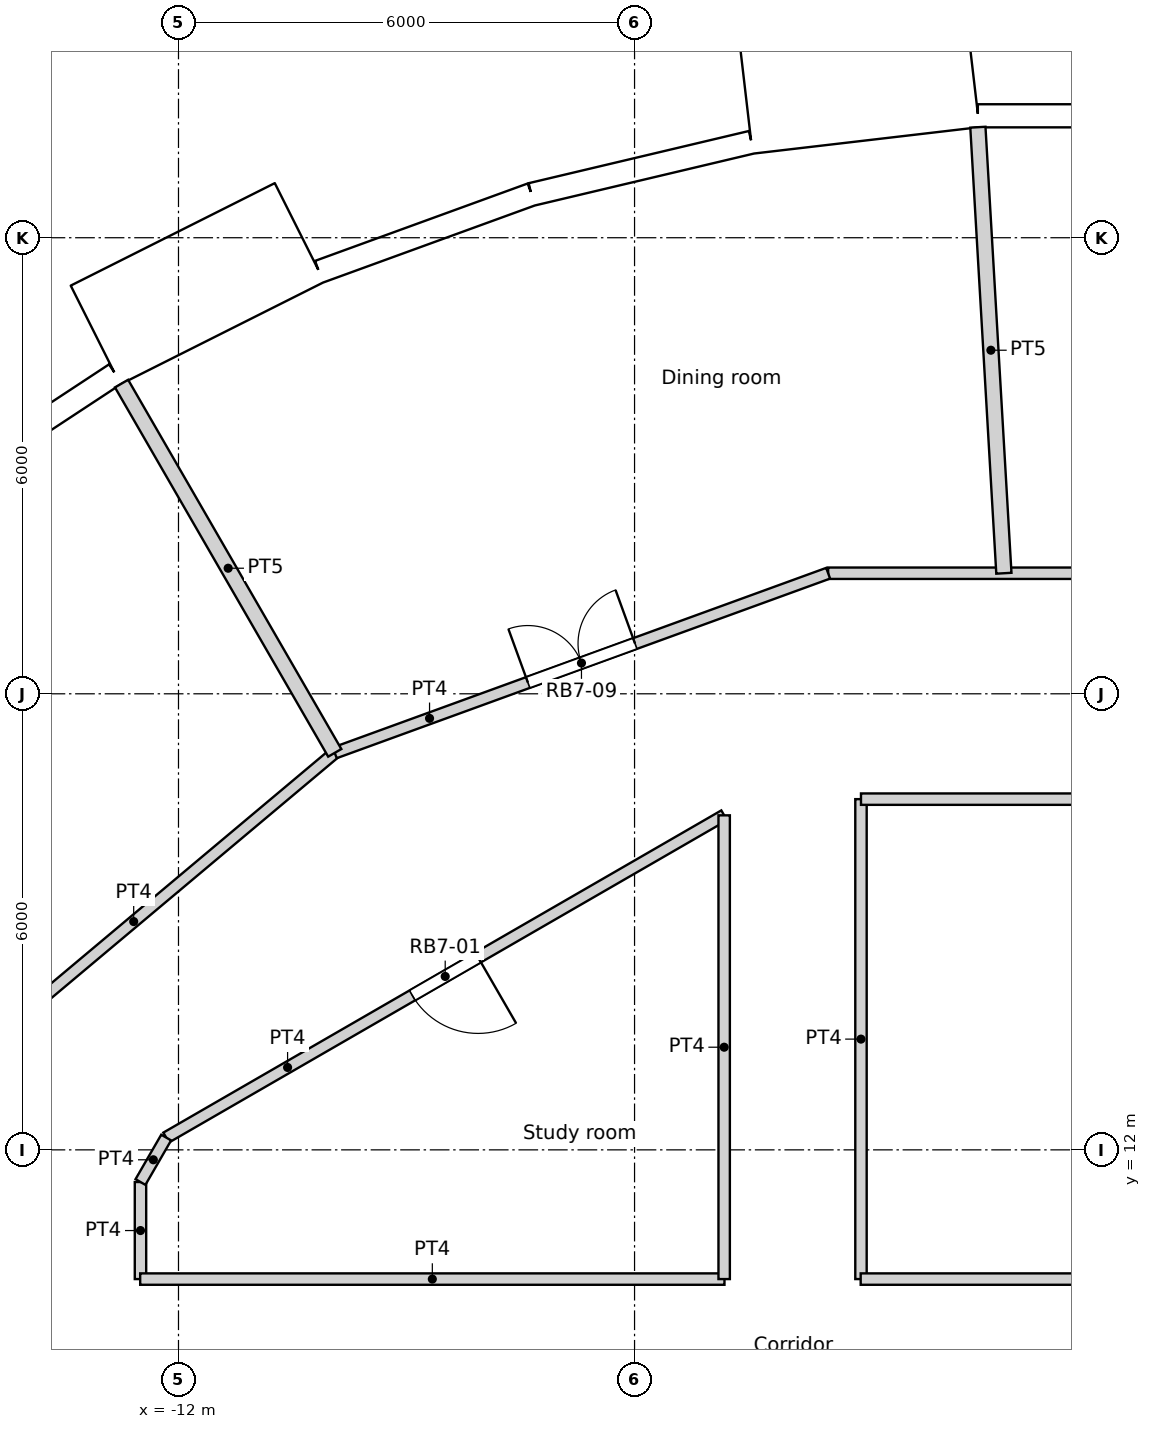
"""IFC4 building model, lengths in metres.
Left out: names, types, materials, properties, quantities, classifications, styles, units other than length and angle.
Written with IfcOpenShell. Run it as: python <this file> out.ifc"""

import sys

from ifc_helpers import new_model, si_unit, direction, frame, frame_2d, origin, origin_2d, place, context, subcontext, project, spatial, rectangle, circle, extrude, element, fill, save


model = new_model("IFC4")
c1 = context("Model", 3, precision=1e-05, world=origin(), true_north=direction((0.0, 1.0)))
c2 = subcontext(c1, "Body", "Model", "MODEL_VIEW")
j1 = project(units=[si_unit("LENGTHUNIT", "METRE"), si_unit("PLANEANGLEUNIT", "RADIAN")], contexts=[c1])
p1 = place(None, origin())
s1 = spatial("IfcSite", under=j1, at=p1, CompositionType="ELEMENT")
p2 = place(p1, origin())
s2 = spatial("IfcBuilding", under=s1, at=p2, CompositionType="ELEMENT")
p3 = place(p2, frame((0.0, 0.0, 190.8)))
s3 = spatial("IfcBuildingStorey", under=s2, at=p3, CompositionType="ELEMENT", Elevation=190.8)
for number, where, z_axis, x_axis in (
    (1, (-1.427, 24.506, 0.0), (0.0, 0.0, 1.0), (1.0, 0.0, 0.0)),
    (2, (-7.04, 23.516, 0.0), (0.0, 0.0, 1.0), (1.0, 0.0, 0.0)),
    (3, (-12.274, 21.259, 0.0), (0.0, 0.0, 1.0), (1.0, 0.0, 0.0)),
):
    element("IfcColumn", number, at=place(p3, frame(where, z_axis=z_axis, x_axis=x_axis)), inside=s3, PredefinedType="COLUMN", context=c2, shape_type="SweptSolid", body=[
        extrude(circle(Radius=0.6, at=origin_2d()), origin(), (0.0, 0.0, 1.0), 3.6),
    ])
for number, where, z_axis, x_axis in (
    (4, (-4.188, 18.35, 0.0), (0.0, 0.0, 1.0), (1.0, 0.0, 0.0)),
    (5, (-9.411, 16.301, 0.0), (0.0, 0.0, 1.0), (1.0, 0.0, 0.0)),
    (6, (-13.798, 12.802, 0.0), (0.0, 0.0, 1.0), (1.0, 0.0, 0.0)),
):
    element("IfcColumn", number, at=place(p3, frame(where, z_axis=z_axis, x_axis=x_axis)), inside=s3, PredefinedType="COLUMN", context=c2, shape_type="SweptSolid", body=[
        extrude(circle(Radius=0.65, at=origin_2d()), origin(), (0.0, 0.0, 1.0), 3.6),
    ])
p4 = place(p3, frame((1.491, 25.604, 0.0), z_axis=(0.0, 0.0, 1.0), x_axis=(-1.0, 0.0, 0.0)))
e7 = element("IfcWall", 7, at=p4, inside=s3, PredefinedType="SOLIDWALL", context=c2, shape_type="SweptSolid", body=[
    extrude(rectangle(XDim=2.973, YDim=0.3, at=frame_2d((1.486, 0.0))), origin(), (0.0, 0.0, 1.0), 3.3),
])
p5 = place(p4, frame((1.486, 0.0, 1.55)))
e8 = element("IfcOpeningElement", 8, at=p5, cuts=e7, PredefinedType="OPENING", context=c2, shape_type="SweptSolid", body=[
    extrude(circle(Radius=0.9, at=origin_2d()), frame((0.0, 0.16, 0.0), z_axis=(0.0, -1.0, 0.0), x_axis=(1.0, 0.0, 0.0)), (0.0, 0.0, 1.0), 0.32),
])
p6 = place(p3, frame((-1.549, 26.176, -0.3), z_axis=(0.0, 0.0, 1.0), x_axis=(-0.9932342274, -0.116128246006, 0.0)))
e9 = element("IfcWall", 9, at=p6, inside=s3, PredefinedType="ELEMENTEDWALL", context=c2, shape_type="SweptSolid", body=[
    extrude(rectangle(XDim=3.0, YDim=1.45, at=frame_2d((1.5, 0.0))), origin(), (0.0, 0.0, 1.0), 3.6),
])
p7 = place(p6, frame((1.5, 0.0, 1.85)))
e10 = element("IfcOpeningElement", 10, at=p7, cuts=e9, PredefinedType="OPENING", context=c2, shape_type="SweptSolid", body=[
    extrude(circle(Radius=0.9, at=origin_2d()), frame((0.0, 0.735, 0.0), z_axis=(0.0, -1.0, 0.0), x_axis=(1.0, 0.0, 0.0)), (0.0, 0.0, 1.0), 1.47),
])
p8 = place(p3, frame((-4.463, 25.256, 0.0), z_axis=(0.0, 0.0, 1.0), x_axis=(-0.973045378923, -0.230613725862, 0.0)))
e11 = element("IfcWall", 11, at=p8, inside=s3, PredefinedType="SOLIDWALL", context=c2, shape_type="SweptSolid", body=[
    extrude(rectangle(XDim=2.973, YDim=0.3, at=frame_2d((1.486, 0.0))), origin(), (0.0, 0.0, 1.0), 2.8),
])
p9 = place(p8, frame((1.486, 0.0, 1.55)))
e12 = element("IfcOpeningElement", 12, at=p9, cuts=e11, PredefinedType="OPENING", context=c2, shape_type="SweptSolid", body=[
    extrude(circle(Radius=0.9, at=origin_2d()), frame((0.0, 0.16, 0.0), z_axis=(0.0, -1.0, 0.0), x_axis=(1.0, 0.0, 0.0)), (0.0, 0.0, 1.0), 0.32),
])
p10 = place(p3, frame((-7.356, 24.57, 0.0), z_axis=(0.0, 0.0, 1.0), x_axis=(-0.939690282133, -0.342026568652, 0.0)))
e13 = element("IfcWall", 13, at=p10, inside=s3, PredefinedType="SOLIDWALL", context=c2, shape_type="SweptSolid", body=[
    extrude(rectangle(XDim=2.973, YDim=0.3, at=frame_2d((1.486, 0.0))), origin(), (0.0, 0.0, 1.0), 3.3),
])
p11 = place(p10, frame((1.486, 0.0, 1.55)))
e14 = element("IfcOpeningElement", 14, at=p11, cuts=e13, PredefinedType="OPENING", context=c2, shape_type="SweptSolid", body=[
    extrude(circle(Radius=0.9, at=origin_2d()), frame((0.0, 0.16, 0.0), z_axis=(0.0, -1.0, 0.0), x_axis=(1.0, 0.0, 0.0)), (0.0, 0.0, 1.0), 0.32),
])
p12 = place(p3, frame((-10.409, 24.068, -0.3), z_axis=(0.0, 0.0, 1.0), x_axis=(-0.893628249713, -0.448807922518, 0.0)))
e15 = element("IfcWall", 15, at=p12, inside=s3, PredefinedType="ELEMENTEDWALL", context=c2, shape_type="SweptSolid", body=[
    extrude(rectangle(XDim=3.0, YDim=1.45, at=frame_2d((1.5, 0.0))), origin(), (0.0, 0.0, 1.0), 3.6),
])
p13 = place(p12, frame((1.5, 0.0, 1.85)))
e16 = element("IfcOpeningElement", 16, at=p13, cuts=e15, PredefinedType="OPENING", context=c2, shape_type="SweptSolid", body=[
    extrude(circle(Radius=0.9, at=origin_2d()), frame((0.0, 0.735, 0.0), z_axis=(0.0, -1.0, 0.0), x_axis=(1.0, 0.0, 0.0)), (0.0, 0.0, 1.0), 1.47),
])
p14 = place(p3, frame((-12.832, 22.206, 0.0), z_axis=(0.0, 0.0, 1.0), x_axis=(-0.835508361394, -0.54947773207, 0.0)))
e17 = element("IfcWall", 17, at=p14, inside=s3, PredefinedType="SOLIDWALL", context=c2, shape_type="SweptSolid", body=[
    extrude(rectangle(XDim=2.973, YDim=0.3, at=frame_2d((1.486, 0.0))), origin(), (0.0, 0.0, 1.0), 2.8),
])
p15 = place(p14, frame((1.486, 0.0, 1.55)))
e18 = element("IfcOpeningElement", 18, at=p15, cuts=e17, PredefinedType="OPENING", context=c2, shape_type="SweptSolid", body=[
    extrude(circle(Radius=0.9, at=origin_2d()), frame((0.0, 0.16, 0.0), z_axis=(0.0, -1.0, 0.0), x_axis=(1.0, 0.0, 0.0)), (0.0, 0.0, 1.0), 0.32),
])
p16 = place(p3, frame((-12.504, 10.3, 0.0), z_axis=(0.0, 0.0, 1.0), x_axis=(1.0, 0.0, 0.0)))
e19 = element("IfcWall", 19, at=p16, inside=s3, PredefinedType="PARTITIONING", context=c2, shape_type="SweptSolid", body=[
    extrude(rectangle(XDim=7.687, YDim=0.15, at=frame_2d((3.844, 0.0))), origin(), (0.0, 0.0, 1.0), 3.3),
])
p17 = place(p3, frame((-3.025, 10.3, 0.0), z_axis=(0.0, 0.0, 1.0), x_axis=(1.0, 0.0, 0.0)))
e20 = element("IfcWall", 20, at=p17, inside=s3, PredefinedType="PARTITIONING", context=c2, shape_type="SweptSolid", body=[
    extrude(rectangle(XDim=16.262, YDim=0.15, at=frame_2d((8.131, 0.0))), origin(), (0.0, 0.0, 1.0), 3.3),
])
p18 = place(p17, frame((6.863, 0.0, 0.0)))
e21 = element("IfcOpeningElement", 21, at=p18, cuts=e20, PredefinedType="OPENING", context=c2, shape_type="SweptSolid", body=[
    extrude(rectangle(XDim=1.8, YDim=2.1, at=frame_2d((0.9, 1.05))), frame((0.0, 0.075, 0.0), z_axis=(0.0, -1.0, 0.0), x_axis=(1.0, 0.0, 0.0)), (0.0, 0.0, 1.0), 0.15),
])
p19 = place(p3, frame((-4.821, 10.3, 0.0), z_axis=(0.0, 0.0, 1.0), x_axis=(0.0, 1.0, 0.0)))
e22 = element("IfcWall", 22, at=p19, inside=s3, PredefinedType="PARTITIONING", context=c2, shape_type="SweptSolid", body=[
    extrude(rectangle(XDim=6.101, YDim=0.15, at=frame_2d((3.05, 0.0))), origin(), (0.0, 0.0, 1.0), 3.3),
])
p20 = place(p3, frame((-12.162, 12.162, 0.0), z_axis=(0.0, 0.0, 1.0), x_axis=(0.866004766557, 0.500035743023, 0.0)))
e23 = element("IfcWall", 23, at=p20, inside=s3, PredefinedType="PARTITIONING", context=c2, shape_type="SweptSolid", body=[
    extrude(rectangle(XDim=8.477, YDim=0.15, at=frame_2d((4.239, 0.0))), origin(), (0.0, 0.0, 1.0), 3.3),
])
p21 = place(p20, frame((3.739, 0.0, 0.0)))
e24 = element("IfcOpeningElement", 24, at=p21, cuts=e23, PredefinedType="OPENING", context=c2, shape_type="SweptSolid", body=[
    extrude(rectangle(XDim=1.0, YDim=2.04, at=frame_2d((0.5, 1.02))), frame((0.0, 0.075, 0.0), z_axis=(0.0, -1.0, 0.0), x_axis=(1.0, 0.0, 0.0)), (0.0, 0.0, 1.0), 0.15),
])
p22 = place(p3, frame((-3.021, 16.614, 0.0), z_axis=(0.0, 0.0, 1.0), x_axis=(1.0, 0.0, 0.0)))
e25 = element("IfcWall", 25, at=p22, inside=s3, PredefinedType="PARTITIONING", context=c2, shape_type="SweptSolid", body=[
    extrude(rectangle(XDim=7.473, YDim=0.15, at=frame_2d((3.736, 0.0))), origin(), (0.0, 0.0, 1.0), 3.3),
])
p23 = place(p3, frame((-3.021, 10.3, 0.0), z_axis=(0.0, 0.0, 1.0), x_axis=(0.0, 1.0, 0.0)))
e26 = element("IfcWall", 26, at=p23, inside=s3, PredefinedType="PARTITIONING", context=c2, shape_type="SweptSolid", body=[
    extrude(rectangle(XDim=6.314, YDim=0.15, at=frame_2d((3.157, 0.0))), origin(), (0.0, 0.0, 1.0), 3.3),
])
p24 = place(p3, frame((-3.453, 19.586, 0.0), z_axis=(0.0, 0.0, 1.0), x_axis=(1.0, 0.0, 0.0)))
e27 = element("IfcWall", 27, at=p24, inside=s3, PredefinedType="PARTITIONING", context=c2, shape_type="SweptSolid", body=[
    extrude(rectangle(XDim=6.906, YDim=0.15, at=frame_2d((3.453, 0.0))), origin(), (0.0, 0.0, 1.0), 3.3),
])
p25 = place(p3, frame((-9.944, 17.223, 0.0), z_axis=(0.0, 0.0, 1.0), x_axis=(0.939672634566, 0.342075050021, 0.0)))
e28 = element("IfcWall", 28, at=p25, inside=s3, PredefinedType="PARTITIONING", context=c2, shape_type="SweptSolid", body=[
    extrude(rectangle(XDim=6.908, YDim=0.15, at=frame_2d((3.454, 0.0))), origin(), (0.0, 0.0, 1.0), 3.3),
])
p26 = place(p25, frame((2.704, 0.0, 0.0)))
e29 = element("IfcOpeningElement", 29, at=p26, cuts=e28, PredefinedType="OPENING", context=c2, shape_type="SweptSolid", body=[
    extrude(rectangle(XDim=1.5, YDim=2.1, at=frame_2d((0.75, 1.05))), frame((0.0, 0.075, 0.0), z_axis=(0.0, -1.0, 0.0), x_axis=(1.0, 0.0, 0.0)), (0.0, 0.0, 1.0), 0.15),
])
p27 = place(p3, frame((-15.235, 12.784, 0.0), z_axis=(0.0, 0.0, 1.0), x_axis=(0.766064078986, 0.642764207845, 0.0)))
e30 = element("IfcWall", 30, at=p27, inside=s3, PredefinedType="PARTITIONING", context=c2, shape_type="SweptSolid", body=[
    extrude(rectangle(XDim=6.906, YDim=0.15, at=frame_2d((3.453, 0.0))), origin(), (0.0, 0.0, 1.0), 3.3),
])
p28 = place(p3, frame((-12.5, 11.577, 0.0), z_axis=(0.0, 0.0, 1.0), x_axis=(0.500024767483, 0.866011103799, 0.0)))
e31 = element("IfcWall", 31, at=p28, inside=s3, PredefinedType="PARTITIONING", context=c2, shape_type="SweptSolid", body=[
    extrude(rectangle(XDim=0.676, YDim=0.15, at=frame_2d((0.338, 0.0))), origin(), (0.0, 0.0, 1.0), 3.3),
])
p29 = place(p3, frame((-12.5, 10.3, 0.0), z_axis=(0.0, 0.0, 1.0), x_axis=(0.0, 1.0, 0.0)))
e32 = element("IfcWall", 32, at=p29, inside=s3, PredefinedType="PARTITIONING", context=c2, shape_type="SweptSolid", body=[
    extrude(rectangle(XDim=1.277, YDim=0.15, at=frame_2d((0.638, 0.0))), origin(), (0.0, 0.0, 1.0), 3.3),
])
p30 = place(p3, frame((-1.483, 25.454, 0.0), z_axis=(0.0, 0.0, 1.0), x_axis=(0.058147412668, -0.998308007781, 0.0)))
e33 = element("IfcWall", 33, at=p30, inside=s3, PredefinedType="PARTITIONING", context=c2, shape_type="SweptSolid", body=[
    extrude(rectangle(XDim=5.878, YDim=0.2, at=frame_2d((2.939, 0.0))), origin(), (0.0, 0.0, 1.0), 3.3),
])
p31 = place(p3, frame((-12.749, 22.081, 0.0), z_axis=(0.0, 0.0, 1.0), x_axis=(0.500010020406, -0.866019618423, 0.0)))
e34 = element("IfcWall", 34, at=p31, inside=s3, PredefinedType="PARTITIONING", context=c2, shape_type="SweptSolid", body=[
    extrude(rectangle(XDim=5.61, YDim=0.2, at=frame_2d((2.805, 0.0))), origin(), (0.0, 0.0, 1.0), 3.3),
])
p32 = place(p5, origin())
e35 = element("IfcWindow", 35, at=p32, inside=s3, PartitioningType="SINGLE_PANEL", PredefinedType="WINDOW", context=c2, shape_type="SweptSolid", body=[
    extrude(circle(Radius=0.9, at=origin_2d()), frame((0.0, 0.12, 0.0), z_axis=(0.0, -1.0, 0.0), x_axis=(1.0, 0.0, 0.0)), (0.0, 0.0, 1.0), 0.1),
])
fill(e8, e35)
p33 = place(p7, origin())
e36 = element("IfcWindow", 36, at=p33, inside=s3, PartitioningType="SINGLE_PANEL", PredefinedType="WINDOW", context=c2, shape_type="SweptSolid", body=[
    extrude(circle(Radius=0.9, at=origin_2d()), frame((0.0, 0.695, 0.0), z_axis=(0.0, -1.0, 0.0), x_axis=(1.0, 0.0, 0.0)), (0.0, 0.0, 1.0), 0.1),
])
fill(e10, e36)
p34 = place(p9, origin())
e37 = element("IfcWindow", 37, at=p34, inside=s3, PartitioningType="SINGLE_PANEL", PredefinedType="WINDOW", context=c2, shape_type="SweptSolid", body=[
    extrude(circle(Radius=0.9, at=origin_2d()), frame((0.0, 0.12, 0.0), z_axis=(0.0, -1.0, 0.0), x_axis=(1.0, 0.0, 0.0)), (0.0, 0.0, 1.0), 0.1),
])
fill(e12, e37)
p35 = place(p11, origin())
e38 = element("IfcWindow", 38, at=p35, inside=s3, PartitioningType="SINGLE_PANEL", PredefinedType="WINDOW", context=c2, shape_type="SweptSolid", body=[
    extrude(circle(Radius=0.9, at=origin_2d()), frame((0.0, 0.12, 0.0), z_axis=(0.0, -1.0, 0.0), x_axis=(1.0, 0.0, 0.0)), (0.0, 0.0, 1.0), 0.1),
])
fill(e14, e38)
p36 = place(p13, origin())
e39 = element("IfcWindow", 39, at=p36, inside=s3, PartitioningType="SINGLE_PANEL", PredefinedType="WINDOW", context=c2, shape_type="SweptSolid", body=[
    extrude(circle(Radius=0.9, at=origin_2d()), frame((0.0, 0.695, 0.0), z_axis=(0.0, -1.0, 0.0), x_axis=(1.0, 0.0, 0.0)), (0.0, 0.0, 1.0), 0.1),
])
fill(e16, e39)
p37 = place(p15, origin())
e40 = element("IfcWindow", 40, at=p37, inside=s3, PartitioningType="SINGLE_PANEL", PredefinedType="WINDOW", context=c2, shape_type="SweptSolid", body=[
    extrude(circle(Radius=0.9, at=origin_2d()), frame((0.0, 0.12, 0.0), z_axis=(0.0, -1.0, 0.0), x_axis=(1.0, 0.0, 0.0)), (0.0, 0.0, 1.0), 0.1),
])
fill(e18, e40)
p38 = place(p21, origin())
e41 = element("IfcDoor", 41, at=p38, inside=s3, OperationType="SINGLE_SWING_LEFT", PredefinedType="DOOR", context=c2, shape_type="SweptSolid", body=[
    extrude(rectangle(XDim=1.0, YDim=2.04, at=frame_2d((0.5, 1.02))), frame((0.0, 0.025, 0.0), z_axis=(0.0, -1.0, 0.0), x_axis=(1.0, 0.0, 0.0)), (0.0, 0.0, 1.0), 0.05),
])
fill(e24, e41)
p39 = place(p26, origin())
e42 = element("IfcDoor", 42, at=p39, inside=s3, OperationType="DOUBLE_DOOR_SINGLE_SWING", PredefinedType="DOOR", context=c2, shape_type="SweptSolid", body=[
    extrude(rectangle(XDim=1.5, YDim=2.1, at=frame_2d((0.75, 1.05))), frame((0.0, 0.025, 0.0), z_axis=(0.0, -1.0, 0.0), x_axis=(1.0, 0.0, 0.0)), (0.0, 0.0, 1.0), 0.05),
])
fill(e29, e42)
save(model, sys.argv[1])
